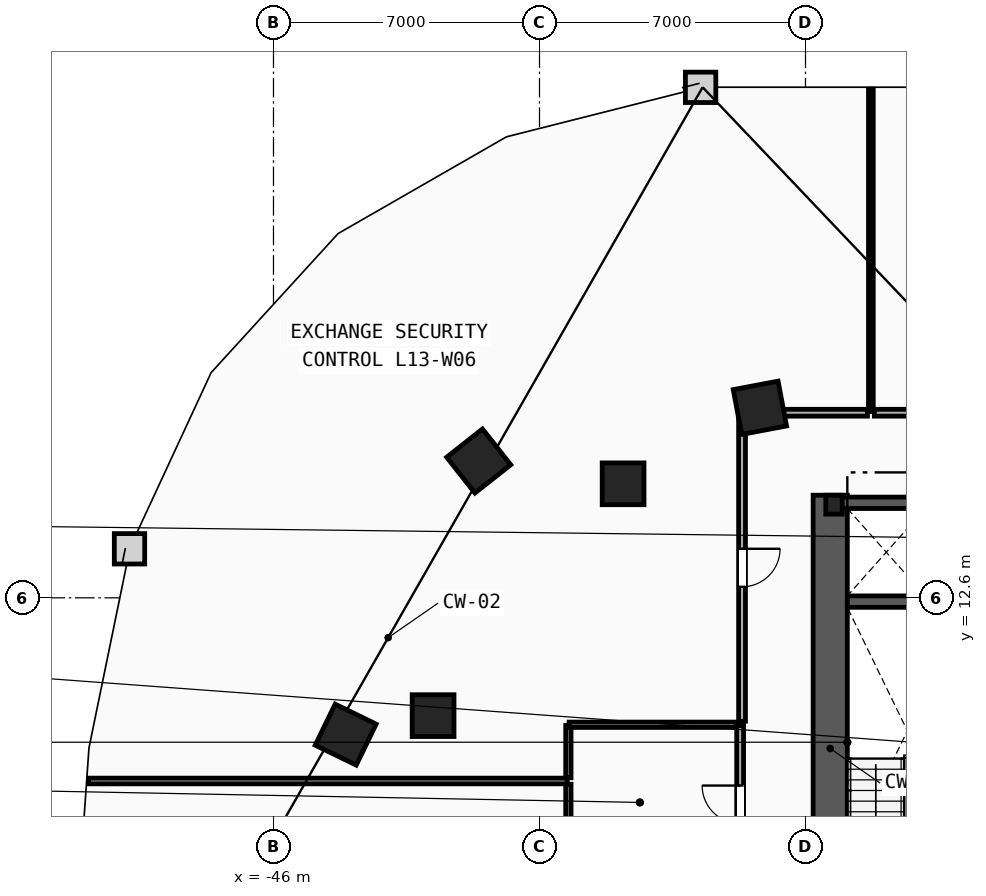
"""IFC4 building model, lengths in metres.
Left out: names, types, materials, properties, quantities, classifications, styles, units other than length and angle.
Written with IfcOpenShell. Run it as: python <this file> out.ifc"""

import sys

from ifc_helpers import new_model, si_unit, direction, frame, frame_2d, origin, origin_2d, place, context, subcontext, project, spatial, rectangle, i_section, extrude, element, fill, save


model = new_model("IFC4")
c1 = context("Model", 3, precision=1e-05, world=origin(), true_north=direction((0.0, 1.0)))
c2 = subcontext(c1, "Body", "Model", "MODEL_VIEW")
j1 = project(units=[si_unit("LENGTHUNIT", "METRE"), si_unit("PLANEANGLEUNIT", "RADIAN")], contexts=[c1])
p1 = place(None, origin())
s1 = spatial("IfcSite", under=j1, at=p1, CompositionType="ELEMENT")
p2 = place(p1, origin())
s2 = spatial("IfcBuilding", under=s1, at=p2, CompositionType="ELEMENT")
p3 = place(p2, frame((0.0, 0.0, 54.4)))
s3 = spatial("IfcBuildingStorey", under=s2, at=p3, CompositionType="ELEMENT", Elevation=54.4)
p4 = place(p3, frame((-31.25, 15.05, 0.0), z_axis=(0.0, 0.0, 1.0), x_axis=(1.0, 0.0, 0.0)))
e1 = element("IfcColumn", 1, at=p4, inside=s3, PredefinedType="COLUMN", context=c2, shape_type="SweptSolid", body=[
    extrude(i_section(OverallWidth=0.432, OverallDepth=0.498, WebThickness=0.056, FlangeThickness=0.089, FilletRadius=0.018, at=origin_2d()), origin(), (0.0, 0.0, 1.0), 3.8),
])
for number, where, z_axis, x_axis in (
    (2, (-41.8, 9.5, 0.0), (0.0, 0.0, 1.0), (1.0, 0.0, 0.0)),
    (3, (-36.8, 15.6, 0.0), (0.0, 0.0, 1.0), (1.0, 0.0, 0.0)),
):
    element("IfcColumn", number, at=place(p3, frame(where, z_axis=z_axis, x_axis=x_axis)), inside=s3, PredefinedType="COLUMN", context=c2, shape_type="SweptSolid", body=[
        extrude(rectangle(XDim=1.1, YDim=1.1, at=origin_2d()), origin(), (0.0, 0.0, 1.0), 3.8),
    ])
for number, where, z_axis, x_axis in (
    (4, (-33.2, 17.6, 0.0), (0.0, 0.0, 1.0), (-0.983, -0.186, 0.0)),
    (5, (-40.6, 16.2, 0.0), (0.0, 0.0, 1.0), (-0.785, -0.619, 0.0)),
    (6, (-44.1, 9.0, 0.0), (0.0, 0.0, 1.0), (-0.437, -0.899, 0.0)),
):
    element("IfcColumn", number, at=place(p3, frame(where, z_axis=z_axis, x_axis=x_axis)), inside=s3, PredefinedType="COLUMN", context=c2, shape_type="SweptSolid", body=[
        extrude(rectangle(XDim=1.2, YDim=1.2, at=origin_2d()), origin(), (0.0, 0.0, 1.0), 3.8),
    ])
p5 = place(p3, frame((-31.35, 1.97, 0.0), z_axis=(0.0, 0.0, 1.0), x_axis=(0.0, 1.0, 0.0)))
e7 = element("IfcWall", 7, at=p5, inside=s3, PredefinedType="SHEAR", context=c2, shape_type="SweptSolid", body=[
    extrude(rectangle(XDim=13.33, YDim=0.9, at=frame_2d((6.665, 0.0))), origin(), (0.0, 0.0, 1.0), 3.5),
])
p6 = place(p3, frame((-30.9, 12.5, 0.0), z_axis=(0.0, 0.0, 1.0), x_axis=(1.0, 0.0, 0.0)))
e8 = element("IfcWall", 8, at=p6, inside=s3, PredefinedType="SHEAR", context=c2, shape_type="SweptSolid", body=[
    extrude(rectangle(XDim=3.16, YDim=0.3, at=frame_2d((1.58, 0.0))), origin(), (0.0, 0.0, 1.0), 3.5),
])
p7 = place(p3, frame((-31.2, 15.1, 0.0), z_axis=(0.0, 0.0, 1.0), x_axis=(1.0, 0.0, 0.0)))
e9 = element("IfcWall", 9, at=p7, inside=s3, PredefinedType="SHEAR", context=c2, shape_type="SweptSolid", body=[
    extrude(rectangle(XDim=2.5, YDim=0.3, at=frame_2d((1.25, 0.0))), origin(), (0.0, 0.0, 1.0), 3.5),
])
p8 = place(p3, frame((-38.24, 5.065, 0.0), z_axis=(0.0, 0.0, 1.0), x_axis=(0.0, 1.0, 0.0)))
e10 = element("IfcWall", 10, at=p8, inside=s3, PredefinedType="PARTITIONING", context=c2, shape_type="SweptSolid", body=[
    extrude(rectangle(XDim=2.63, YDim=0.14, at=frame_2d((1.315, 0.0))), origin(), (0.0, 0.0, 1.0), 3.5),
])
p9 = place(p3, frame((-38.24, 7.865, 0.0), z_axis=(0.0, 0.0, 1.0), x_axis=(0.0, 1.0, 0.0)))
e11 = element("IfcWall", 11, at=p9, inside=s3, PredefinedType="PARTITIONING", context=c2, shape_type="SweptSolid", body=[
    extrude(rectangle(XDim=1.375, YDim=0.14, at=frame_2d((0.688, 0.0))), origin(), (0.0, 0.0, 1.0), 3.5),
])
p10 = place(p3, frame((-38.22, 9.26, 0.0), z_axis=(0.0, 0.0, 1.0), x_axis=(1.0, 0.0, 0.0)))
e12 = element("IfcWall", 12, at=p10, inside=s3, PredefinedType="PARTITIONING", context=c2, shape_type="SweptSolid", body=[
    extrude(rectangle(XDim=4.48, YDim=0.14, at=frame_2d((2.24, 0.0))), origin(), (0.0, 0.0, 1.0), 3.5),
])
p11 = place(p3, frame((-33.72, 5.08, 0.0), z_axis=(0.0, 0.0, 1.0), x_axis=(0.0, 1.0, 0.0)))
e13 = element("IfcWall", 13, at=p11, inside=s3, PredefinedType="PARTITIONING", context=c2, shape_type="SweptSolid", body=[
    extrude(rectangle(XDim=4.16, YDim=0.18, at=frame_2d((2.08, 0.0))), origin(), (0.0, 0.0, 1.0), 3.5),
])
p12 = place(p11, frame((1.58, 0.0, 0.0)))
e14 = element("IfcOpeningElement", 14, at=p12, cuts=e13, PredefinedType="OPENING", context=c2, shape_type="SweptSolid", body=[
    extrude(rectangle(XDim=1.0, YDim=2.15, at=frame_2d((0.5, 1.075))), frame((0.0, 0.1, 0.0), z_axis=(0.0, -1.0, 0.0), x_axis=(1.0, 0.0, 0.0)), (0.0, 0.0, 1.0), 0.2),
])
p13 = place(p3, frame((-50.866, 7.78, 0.0), z_axis=(0.0, 0.0, 1.0), x_axis=(1.0, 0.0, 0.0)))
e15 = element("IfcWall", 15, at=p13, inside=s3, PredefinedType="PARTITIONING", context=c2, shape_type="SweptSolid", body=[
    extrude(rectangle(XDim=12.596, YDim=0.15, at=frame_2d((6.298, 0.0))), origin(), (0.0, 0.0, 1.0), 3.5),
])
p14 = place(p3, frame((-30.28, 17.5, 0.0), z_axis=(0.0, 0.0, 1.0), x_axis=(0.0, 1.0, 0.0)))
e16 = element("IfcWall", 16, at=p14, inside=s3, PredefinedType="PARTITIONING", context=c2, shape_type="SweptSolid", body=[
    extrude(rectangle(XDim=8.485, YDim=0.125, at=frame_2d((4.243, 0.0))), origin(), (0.0, 0.0, 1.0), 3.5),
])
p15 = place(p3, frame((-16.822, 17.47, 0.0), z_axis=(0.0, 0.0, 1.0), x_axis=(-1.0, 0.0, 0.0)))
e17 = element("IfcWall", 17, at=p15, inside=s3, PredefinedType="PARTITIONING", context=c2, shape_type="SweptSolid", body=[
    extrude(rectangle(XDim=13.368, YDim=0.18, at=frame_2d((6.684, 0.0))), origin(), (0.0, 0.0, 1.0), 3.5),
])
p16 = place(p3, frame((-33.67, 17.428, 0.0), z_axis=(0.0, 0.0, 1.0), x_axis=(0.0, -1.0, 0.0)))
e18 = element("IfcWall", 18, at=p16, inside=s3, PredefinedType="PARTITIONING", context=c2, shape_type="SweptSolid", body=[
    extrude(rectangle(XDim=8.077, YDim=0.18, at=frame_2d((4.039, 0.0))), origin(), (0.0, 0.0, 1.0), 3.5),
])
p17 = place(p16, frame((3.539, 0.0, 0.0)))
e19 = element("IfcOpeningElement", 19, at=p17, cuts=e18, PredefinedType="OPENING", context=c2, shape_type="SweptSolid", body=[
    extrude(rectangle(XDim=1.0, YDim=2.15, at=frame_2d((0.5, 1.075))), frame((0.0, 0.1, 0.0), z_axis=(0.0, -1.0, 0.0), x_axis=(1.0, 0.0, 0.0)), (0.0, 0.0, 1.0), 0.2),
])
p18 = place(p3, frame((-30.37, 17.47, 0.0), z_axis=(0.0, 0.0, 1.0), x_axis=(-1.0, 0.0, 0.0)))
e20 = element("IfcWall", 20, at=p18, inside=s3, PredefinedType="PARTITIONING", context=c2, shape_type="SweptSolid", body=[
    extrude(rectangle(XDim=3.258, YDim=0.18, at=frame_2d((1.629, 0.0))), origin(), (0.0, 0.0, 1.0), 3.5),
])
p19 = place(p17, origin())
e21 = element("IfcDoor", 21, at=p19, inside=s3, OperationType="SINGLE_SWING_LEFT", PredefinedType="DOOR", context=c2, shape_type="SweptSolid", body=[
    extrude(rectangle(XDim=1.0, YDim=2.15, at=frame_2d((0.5, 1.075))), frame((0.0, 0.025, 0.0), z_axis=(0.0, -1.0, 0.0), x_axis=(1.0, 0.0, 0.0)), (0.0, 0.0, 1.0), 0.05),
])
fill(e19, e21)
p20 = place(p12, origin())
e22 = element("IfcDoor", 22, at=p20, inside=s3, OperationType="SINGLE_SWING_RIGHT", PredefinedType="DOOR", context=c2, shape_type="SweptSolid", body=[
    extrude(rectangle(XDim=1.0, YDim=2.15, at=frame_2d((0.5, 1.075))), frame((0.0, 0.025, 0.0), z_axis=(0.0, -1.0, 0.0), x_axis=(1.0, 0.0, 0.0)), (0.0, 0.0, 1.0), 0.05),
])
fill(e14, e22)
save(model, sys.argv[1])
